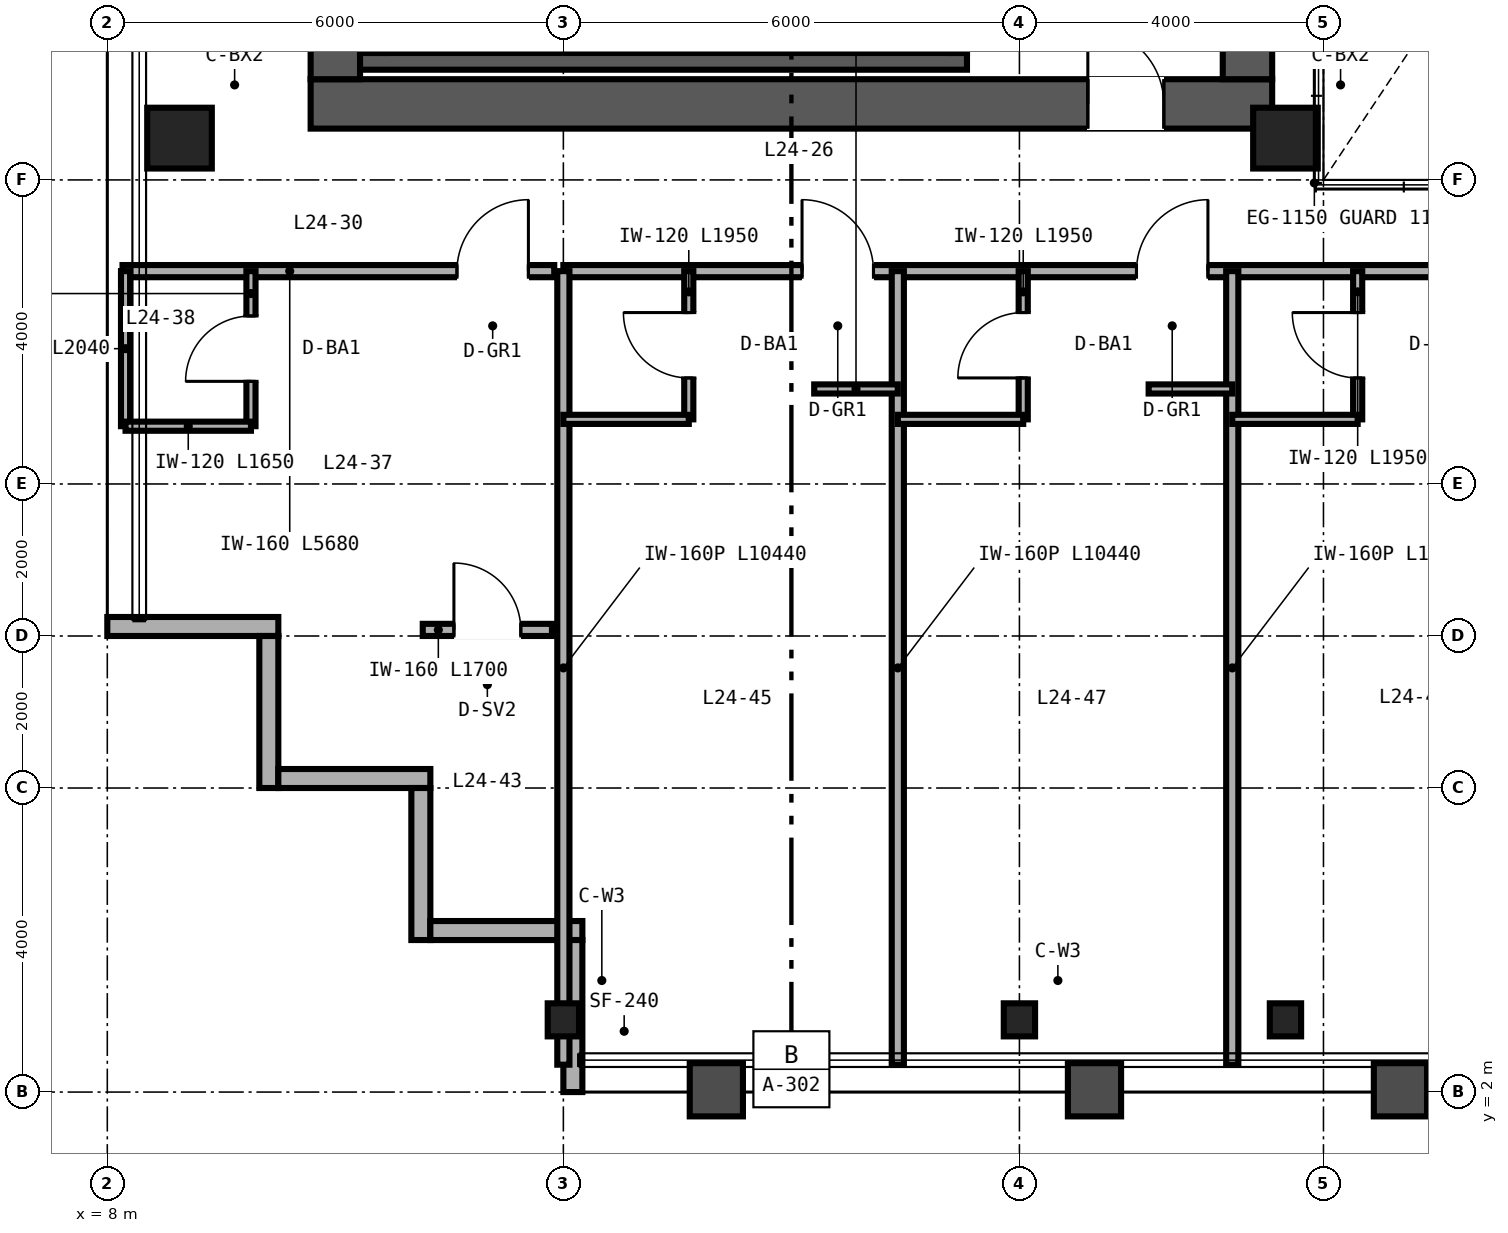
"""IFC4 building model, lengths in metres.
Left out: names, types, materials, properties, quantities, classifications, styles, units other than length and angle.
Written with IfcOpenShell. Run it as: python <this file> out.ifc"""

import sys

from ifc_helpers import new_model, si_unit, direction, frame, frame_2d, origin, origin_2d, place, context, subcontext, project, spatial, rectangle, hollow_rectangle, i_section, extrude, source, transform, mapped, element, fill, save


model = new_model("IFC4")
c1 = context("Model", 3, precision=1e-05, world=origin(), true_north=direction((0.0, 1.0)))
c2 = subcontext(c1, "Body", "Model", "MODEL_VIEW")
j1 = project(units=[si_unit("LENGTHUNIT", "METRE"), si_unit("PLANEANGLEUNIT", "RADIAN")], contexts=[c1])
p1 = place(None, origin())
s1 = spatial("IfcSite", under=j1, at=p1, CompositionType="ELEMENT")
p2 = place(p1, origin())
s2 = spatial("IfcBuilding", under=s1, at=p2, CompositionType="ELEMENT")
p3 = place(p2, frame((0.0, 0.0, 100.8)))
s3 = spatial("IfcBuildingStorey", under=s2, at=p3, CompositionType="ELEMENT", Elevation=100.8)
p4 = place(p3, frame((10.675, 15.0, 0.0), z_axis=(0.0, 0.0, 1.0), x_axis=(1.0, 0.0, 0.0)))
e1 = element("IfcWall", 1, at=p4, inside=s3, PredefinedType="SHEAR", context=c2, shape_type="SweptSolid", body=[
    extrude(rectangle(XDim=12.65, YDim=0.65, at=frame_2d((6.325, 0.0))), origin(), (0.0, 0.0, 1.0), 3.36),
])
p5 = place(p4, frame((10.225, 0.0, 0.0)))
e2 = element("IfcOpeningElement", 2, at=p5, cuts=e1, PredefinedType="OPENING", context=c2, shape_type="SweptSolid", body=[
    extrude(rectangle(XDim=1.0, YDim=2.15, at=frame_2d((0.5, 1.075))), frame((0.0, 0.335, 0.0), z_axis=(0.0, -1.0, 0.0), x_axis=(1.0, 0.0, 0.0)), (0.0, 0.0, 1.0), 0.67),
])
for number, where, z_axis, x_axis in (
    (3, (11.0, 15.325, 0.0), (0.0, 0.0, 1.0), (0.0, 1.0, 0.0)),
    (4, (23.0, 15.325, 0.0), (0.0, 0.0, 1.0), (0.0, 1.0, 0.0)),
):
    element("IfcWall", number, at=place(p3, frame(where, z_axis=z_axis, x_axis=x_axis)), inside=s3, PredefinedType="SHEAR", context=c2, shape_type="SweptSolid", body=[
        extrude(rectangle(XDim=21.35, YDim=0.65, at=frame_2d((10.675, 0.0))), origin(), (0.0, 0.0, 1.0), 3.36),
    ])
p6 = place(p3, frame((11.325, 15.56, 0.0), z_axis=(0.0, 0.0, 1.0), x_axis=(1.0, 0.0, 0.0)))
e5 = element("IfcWall", 5, at=p6, inside=s3, PredefinedType="SHEAR", context=c2, shape_type="SweptSolid", body=[
    extrude(rectangle(XDim=7.985, YDim=0.22, at=frame_2d((3.993, 0.0))), origin(), (0.0, 0.0, 1.0), 3.4),
])
for number, where, z_axis, x_axis in (
    (6, (11.56, 15.67, 0.0), (0.0, 0.0, 1.0), (0.0, 1.0, 0.0)),
    (7, (19.2, 15.67, 0.0), (0.0, 0.0, 1.0), (0.0, 1.0, 0.0)),
):
    element("IfcWall", number, at=place(p3, frame(where, z_axis=z_axis, x_axis=x_axis)), inside=s3, PredefinedType="SHEAR", context=c2, shape_type="SweptSolid", body=[
        extrude(rectangle(XDim=3.28, YDim=0.22, at=frame_2d((1.64, 0.0))), origin(), (0.0, 0.0, 1.0), 3.4),
    ])
m1 = source(origin(), c2, "Body", "SweptSolid", [
    extrude(hollow_rectangle(XDim=0.85, YDim=0.8, WallThickness=0.032, at=origin_2d()), origin(), (0.0, 0.0, 1.0), 3.36),
])
for number, where, z_axis, x_axis in (
    (8, (8.95, 14.55, 0.0), (0.0, 0.0, 1.0), (1.0, 0.0, 0.0)),
    (9, (23.5, 14.55, 0.0), (0.0, 0.0, 1.0), (1.0, 0.0, 0.0)),
):
    element("IfcColumn", number, at=place(p3, frame(where, z_axis=z_axis, x_axis=x_axis)), inside=s3, PredefinedType="COLUMN", context=c2, shape_type="MappedRepresentation", body=[
        mapped(m1, transform((0.0, 0.0, 0.0), scale=1.0)),
    ])
m2 = source(origin(), c2, "Body", "SweptSolid", [
    extrude(i_section(OverallWidth=0.412, OverallDepth=0.435, WebThickness=0.036, FlangeThickness=0.057, FilletRadius=0.025, at=origin_2d()), origin(), (0.0, 0.0, 1.0), 3.36),
])
for number, where, z_axis, x_axis in (
    (10, (14.0, 2.95, 0.0), (0.0, 0.0, 1.0), (1.0, 0.0, 0.0)),
    (11, (20.0, 2.95, 0.0), (0.0, 0.0, 1.0), (1.0, 0.0, 0.0)),
    (12, (23.5, 2.95, 0.0), (0.0, 0.0, 1.0), (1.0, 0.0, 0.0)),
):
    element("IfcColumn", number, at=place(p3, frame(where, z_axis=z_axis, x_axis=x_axis)), inside=s3, PredefinedType="COLUMN", context=c2, shape_type="MappedRepresentation", body=[
        mapped(m2, transform((0.0, 0.0, 0.0), scale=1.0)),
    ])
p7 = place(p3, frame((8.0, 8.125, 0.0), z_axis=(0.0, 0.0, 1.0), x_axis=(1.0, 0.0, 0.0)))
e13 = element("IfcWall", 13, at=p7, inside=s3, PredefinedType="SOLIDWALL", context=c2, shape_type="SweptSolid", body=[
    extrude(rectangle(XDim=2.25, YDim=0.25, at=frame_2d((1.125, 0.0))), origin(), (0.0, 0.0, 1.0), 3.36),
])
for number, where, z_axis, x_axis in (
    (14, (10.125, 8.0, 0.0), (0.0, 0.0, 1.0), (0.0, -1.0, 0.0)),
    (15, (10.25, 6.125, 0.0), (0.0, 0.0, 1.0), (1.0, 0.0, 0.0)),
    (16, (12.125, 6.0, 0.0), (0.0, 0.0, 1.0), (0.0, -1.0, 0.0)),
    (17, (12.25, 4.125, 0.0), (0.0, 0.0, 1.0), (1.0, 0.0, 0.0)),
):
    element("IfcWall", number, at=place(p3, frame(where, z_axis=z_axis, x_axis=x_axis)), inside=s3, PredefinedType="SOLIDWALL", context=c2, shape_type="SweptSolid", body=[
        extrude(rectangle(XDim=2.0, YDim=0.25, at=frame_2d((1.0, 0.0))), origin(), (0.0, 0.0, 1.0), 3.36),
    ])
p8 = place(p3, frame((14.125, 4.0, 0.0), z_axis=(0.0, 0.0, 1.0), x_axis=(0.0, -1.0, 0.0)))
e18 = element("IfcWall", 18, at=p8, inside=s3, PredefinedType="SOLIDWALL", context=c2, shape_type="SweptSolid", body=[
    extrude(rectangle(XDim=2.0, YDim=0.25, at=frame_2d((1.0, 0.0))), origin(), (0.0, 0.0, 1.0), 2.667),
])
p9 = place(p3, frame((8.2, 12.8, 0.0), z_axis=(0.0, 0.0, 1.0), x_axis=(1.0, 0.0, 0.0)))
e19 = element("IfcWall", 19, at=p9, inside=s3, PredefinedType="PARTITIONING", context=c2, shape_type="SweptSolid", body=[
    extrude(rectangle(XDim=5.68, YDim=0.16, at=frame_2d((2.84, 0.0))), origin(), (0.0, 0.0, 1.0), 3.36),
])
p10 = place(p9, frame((4.4, 0.0, 0.0)))
e20 = element("IfcOpeningElement", 20, at=p10, cuts=e19, PredefinedType="OPENING", context=c2, shape_type="SweptSolid", body=[
    extrude(rectangle(XDim=0.94, YDim=2.15, at=frame_2d((0.47, 1.075))), frame((0.0, 0.09, 0.0), z_axis=(0.0, -1.0, 0.0), x_axis=(1.0, 0.0, 0.0)), (0.0, 0.0, 1.0), 0.18),
])
p11 = place(p3, frame((9.89, 10.76, 0.0), z_axis=(0.0, 0.0, 1.0), x_axis=(0.0, 1.0, 0.0)))
e21 = element("IfcWall", 21, at=p11, inside=s3, PredefinedType="PARTITIONING", context=c2, shape_type="SweptSolid", body=[
    extrude(rectangle(XDim=2.04, YDim=0.12, at=frame_2d((1.02, 0.0))), origin(), (0.0, 0.0, 1.0), 3.36),
])
p12 = place(p11, frame((0.59, 0.0, 0.0)))
e22 = element("IfcOpeningElement", 22, at=p12, cuts=e21, PredefinedType="OPENING", context=c2, shape_type="SweptSolid", body=[
    extrude(rectangle(XDim=0.86, YDim=2.1, at=frame_2d((0.43, 1.05))), frame((0.0, 0.07, 0.0), z_axis=(0.0, -1.0, 0.0), x_axis=(1.0, 0.0, 0.0)), (0.0, 0.0, 1.0), 0.14),
])
p13 = place(p3, frame((8.24, 10.76, 0.0), z_axis=(0.0, 0.0, 1.0), x_axis=(0.0, 1.0, 0.0)))
e23 = element("IfcWall", 23, at=p13, inside=s3, PredefinedType="PARTITIONING", context=c2, shape_type="SweptSolid", body=[
    extrude(rectangle(XDim=2.04, YDim=0.12, at=frame_2d((1.02, 0.0))), origin(), (0.0, 0.0, 1.0), 3.36),
])
p14 = place(p3, frame((8.24, 10.76, 0.0), z_axis=(0.0, 0.0, 1.0), x_axis=(1.0, 0.0, 0.0)))
e24 = element("IfcWall", 24, at=p14, inside=s3, PredefinedType="PARTITIONING", context=c2, shape_type="SweptSolid", body=[
    extrude(rectangle(XDim=1.65, YDim=0.12, at=frame_2d((0.825, 0.0))), origin(), (0.0, 0.0, 1.0), 3.36),
])
p15 = place(p3, frame((12.15, 8.08, 0.0), z_axis=(0.0, 0.0, 1.0), x_axis=(1.0, 0.0, 0.0)))
e25 = element("IfcWall", 25, at=p15, inside=s3, PredefinedType="PARTITIONING", context=c2, shape_type="SweptSolid", body=[
    extrude(rectangle(XDim=1.7, YDim=0.16, at=frame_2d((0.85, 0.0))), origin(), (0.0, 0.0, 1.0), 3.36),
])
p16 = place(p15, frame((0.41, 0.0, 0.0)))
e26 = element("IfcOpeningElement", 26, at=p16, cuts=e25, PredefinedType="OPENING", context=c2, shape_type="SweptSolid", body=[
    extrude(rectangle(XDim=0.88, YDim=2.15, at=frame_2d((0.44, 1.075))), frame((0.0, 0.09, 0.0), z_axis=(0.0, -1.0, 0.0), x_axis=(1.0, 0.0, 0.0)), (0.0, 0.0, 1.0), 0.18),
])
p17 = place(p3, frame((14.0, 12.8, 0.0), z_axis=(0.0, 0.0, 1.0), x_axis=(1.0, 0.0, 0.0)))
e27 = element("IfcWall", 27, at=p17, inside=s3, PredefinedType="PARTITIONING", context=c2, shape_type="SweptSolid", body=[
    extrude(rectangle(XDim=36.0, YDim=0.16, at=frame_2d((18.0, 0.0))), origin(), (0.0, 0.0, 1.0), 2.581),
])
p18 = place(p17, frame((3.14, 0.0, 0.0)))
e28 = element("IfcOpeningElement", 28, at=p18, cuts=e27, PredefinedType="OPENING", context=c2, shape_type="SweptSolid", body=[
    extrude(rectangle(XDim=0.94, YDim=2.15, at=frame_2d((0.47, 1.075))), frame((0.0, 0.09, 0.0), z_axis=(0.0, -1.0, 0.0), x_axis=(1.0, 0.0, 0.0)), (0.0, 0.0, 1.0), 0.18),
])
p19 = place(p17, frame((7.54, 0.0, 0.0)))
e29 = element("IfcOpeningElement", 29, at=p19, cuts=e27, PredefinedType="OPENING", context=c2, shape_type="SweptSolid", body=[
    extrude(rectangle(XDim=0.94, YDim=2.15, at=frame_2d((0.47, 1.075))), frame((0.0, 0.09, 0.0), z_axis=(0.0, -1.0, 0.0), x_axis=(1.0, 0.0, 0.0)), (0.0, 0.0, 1.0), 0.18),
])
p20 = place(p17, frame((12.14, 0.0, 0.0)))
e30 = element("IfcOpeningElement", 30, at=p20, cuts=e27, PredefinedType="OPENING", context=c2, shape_type="SweptSolid", body=[
    extrude(rectangle(XDim=0.94, YDim=2.15, at=frame_2d((0.47, 1.075))), frame((0.0, 0.09, 0.0), z_axis=(0.0, -1.0, 0.0), x_axis=(1.0, 0.0, 0.0)), (0.0, 0.0, 1.0), 0.18),
])
p21 = place(p17, frame((16.94, 0.0, 0.0)))
e31 = element("IfcOpeningElement", 31, at=p21, cuts=e27, PredefinedType="OPENING", context=c2, shape_type="SweptSolid", body=[
    extrude(rectangle(XDim=0.94, YDim=2.15, at=frame_2d((0.47, 1.075))), frame((0.0, 0.09, 0.0), z_axis=(0.0, -1.0, 0.0), x_axis=(1.0, 0.0, 0.0)), (0.0, 0.0, 1.0), 0.18),
])
p22 = place(p17, frame((21.74, 0.0, 0.0)))
e32 = element("IfcOpeningElement", 32, at=p22, cuts=e27, PredefinedType="OPENING", context=c2, shape_type="SweptSolid", body=[
    extrude(rectangle(XDim=0.94, YDim=2.15, at=frame_2d((0.47, 1.075))), frame((0.0, 0.09, 0.0), z_axis=(0.0, -1.0, 0.0), x_axis=(1.0, 0.0, 0.0)), (0.0, 0.0, 1.0), 0.18),
])
p23 = place(p17, frame((26.34, 0.0, 0.0)))
e33 = element("IfcOpeningElement", 33, at=p23, cuts=e27, PredefinedType="OPENING", context=c2, shape_type="SweptSolid", body=[
    extrude(rectangle(XDim=0.94, YDim=2.15, at=frame_2d((0.47, 1.075))), frame((0.0, 0.09, 0.0), z_axis=(0.0, -1.0, 0.0), x_axis=(1.0, 0.0, 0.0)), (0.0, 0.0, 1.0), 0.18),
])
p24 = place(p17, frame((30.54, 0.0, 0.0)))
e34 = element("IfcOpeningElement", 34, at=p24, cuts=e27, PredefinedType="OPENING", context=c2, shape_type="SweptSolid", body=[
    extrude(rectangle(XDim=0.94, YDim=2.15, at=frame_2d((0.47, 1.075))), frame((0.0, 0.09, 0.0), z_axis=(0.0, -1.0, 0.0), x_axis=(1.0, 0.0, 0.0)), (0.0, 0.0, 1.0), 0.18),
])
p25 = place(p17, frame((34.74, 0.0, 0.0)))
e35 = element("IfcOpeningElement", 35, at=p25, cuts=e27, PredefinedType="OPENING", context=c2, shape_type="SweptSolid", body=[
    extrude(rectangle(XDim=0.94, YDim=2.15, at=frame_2d((0.47, 1.075))), frame((0.0, 0.09, 0.0), z_axis=(0.0, -1.0, 0.0), x_axis=(1.0, 0.0, 0.0)), (0.0, 0.0, 1.0), 0.18),
])
for number, where, z_axis, x_axis in (
    (36, (14.0, 2.36, 0.0), (0.0, 0.0, 1.0), (0.0, 1.0, 0.0)),
    (37, (18.4, 2.36, 0.0), (0.0, 0.0, 1.0), (0.0, 1.0, 0.0)),
):
    element("IfcWall", number, at=place(p3, frame(where, z_axis=z_axis, x_axis=x_axis)), inside=s3, PredefinedType="PARTITIONING", context=c2, shape_type="SweptSolid", body=[
        extrude(rectangle(XDim=10.44, YDim=0.16, at=frame_2d((5.22, 0.0))), origin(), (0.0, 0.0, 1.0), 2.667),
    ])
p26 = place(p3, frame((15.65, 10.85, 0.0), z_axis=(0.0, 0.0, 1.0), x_axis=(0.0, 1.0, 0.0)))
e38 = element("IfcWall", 38, at=p26, inside=s3, PredefinedType="PARTITIONING", context=c2, shape_type="SweptSolid", body=[
    extrude(rectangle(XDim=1.95, YDim=0.12, at=frame_2d((0.975, 0.0))), origin(), (0.0, 0.0, 1.0), 3.36),
])
p27 = place(p26, frame((0.545, 0.0, 0.0)))
e39 = element("IfcOpeningElement", 39, at=p27, cuts=e38, PredefinedType="OPENING", context=c2, shape_type="SweptSolid", body=[
    extrude(rectangle(XDim=0.86, YDim=2.1, at=frame_2d((0.43, 1.05))), frame((0.0, 0.07, 0.0), z_axis=(0.0, -1.0, 0.0), x_axis=(1.0, 0.0, 0.0)), (0.0, 0.0, 1.0), 0.14),
])
p28 = place(p3, frame((14.0, 10.85, 0.0), z_axis=(0.0, 0.0, 1.0), x_axis=(1.0, 0.0, 0.0)))
e40 = element("IfcWall", 40, at=p28, inside=s3, PredefinedType="PARTITIONING", context=c2, shape_type="SweptSolid", body=[
    extrude(rectangle(XDim=1.65, YDim=0.12, at=frame_2d((0.825, 0.0))), origin(), (0.0, 0.0, 1.0), 3.36),
])
p29 = place(p3, frame((17.3, 11.25, 0.0), z_axis=(0.0, 0.0, 1.0), x_axis=(1.0, 0.0, 0.0)))
e41 = element("IfcWall", 41, at=p29, inside=s3, PredefinedType="PARTITIONING", context=c2, shape_type="SweptSolid", body=[
    extrude(rectangle(XDim=1.1, YDim=0.12, at=frame_2d((0.55, 0.0))), origin(), (0.0, 0.0, 1.0), 3.36),
])
p30 = place(p3, frame((22.8, 2.36, 0.0), z_axis=(0.0, 0.0, 1.0), x_axis=(0.0, 1.0, 0.0)))
e42 = element("IfcWall", 42, at=p30, inside=s3, PredefinedType="PARTITIONING", context=c2, shape_type="SweptSolid", body=[
    extrude(rectangle(XDim=10.44, YDim=0.16, at=frame_2d((5.22, 0.0))), origin(), (0.0, 0.0, 1.0), 2.823),
])
p31 = place(p3, frame((20.05, 10.85, 0.0), z_axis=(0.0, 0.0, 1.0), x_axis=(0.0, 1.0, 0.0)))
e43 = element("IfcWall", 43, at=p31, inside=s3, PredefinedType="PARTITIONING", context=c2, shape_type="SweptSolid", body=[
    extrude(rectangle(XDim=1.95, YDim=0.12, at=frame_2d((0.975, 0.0))), origin(), (0.0, 0.0, 1.0), 3.36),
])
p32 = place(p31, frame((0.545, 0.0, 0.0)))
e44 = element("IfcOpeningElement", 44, at=p32, cuts=e43, PredefinedType="OPENING", context=c2, shape_type="SweptSolid", body=[
    extrude(rectangle(XDim=0.86, YDim=2.1, at=frame_2d((0.43, 1.05))), frame((0.0, 0.07, 0.0), z_axis=(0.0, -1.0, 0.0), x_axis=(1.0, 0.0, 0.0)), (0.0, 0.0, 1.0), 0.14),
])
p33 = place(p3, frame((18.4, 10.85, 0.0), z_axis=(0.0, 0.0, 1.0), x_axis=(1.0, 0.0, 0.0)))
e45 = element("IfcWall", 45, at=p33, inside=s3, PredefinedType="PARTITIONING", context=c2, shape_type="SweptSolid", body=[
    extrude(rectangle(XDim=1.65, YDim=0.12, at=frame_2d((0.825, 0.0))), origin(), (0.0, 0.0, 1.0), 3.36),
])
p34 = place(p3, frame((21.7, 11.25, 0.0), z_axis=(0.0, 0.0, 1.0), x_axis=(1.0, 0.0, 0.0)))
e46 = element("IfcWall", 46, at=p34, inside=s3, PredefinedType="PARTITIONING", context=c2, shape_type="SweptSolid", body=[
    extrude(rectangle(XDim=1.1, YDim=0.12, at=frame_2d((0.55, 0.0))), origin(), (0.0, 0.0, 1.0), 3.36),
])
p35 = place(p3, frame((24.45, 10.85, 0.0), z_axis=(0.0, 0.0, 1.0), x_axis=(0.0, 1.0, 0.0)))
e47 = element("IfcWall", 47, at=p35, inside=s3, PredefinedType="PARTITIONING", context=c2, shape_type="SweptSolid", body=[
    extrude(rectangle(XDim=1.95, YDim=0.12, at=frame_2d((0.975, 0.0))), origin(), (0.0, 0.0, 1.0), 3.36),
])
p36 = place(p35, frame((0.545, 0.0, 0.0)))
e48 = element("IfcOpeningElement", 48, at=p36, cuts=e47, PredefinedType="OPENING", context=c2, shape_type="SweptSolid", body=[
    extrude(rectangle(XDim=0.86, YDim=2.1, at=frame_2d((0.43, 1.05))), frame((0.0, 0.07, 0.0), z_axis=(0.0, -1.0, 0.0), x_axis=(1.0, 0.0, 0.0)), (0.0, 0.0, 1.0), 0.14),
])
p37 = place(p3, frame((22.8, 10.85, 0.0), z_axis=(0.0, 0.0, 1.0), x_axis=(1.0, 0.0, 0.0)))
e49 = element("IfcWall", 49, at=p37, inside=s3, PredefinedType="PARTITIONING", context=c2, shape_type="SweptSolid", body=[
    extrude(rectangle(XDim=1.65, YDim=0.12, at=frame_2d((0.825, 0.0))), origin(), (0.0, 0.0, 1.0), 2.581),
])
m3 = source(origin(), c2, "Body", "SweptSolid", [
    extrude(rectangle(XDim=1.0, YDim=2.15, at=frame_2d((0.5, 1.075))), frame((0.0, 0.025, 0.0), z_axis=(0.0, -1.0, 0.0), x_axis=(1.0, 0.0, 0.0)), (0.0, 0.0, 1.0), 0.05),
])
p38 = place(p5, origin())
e50 = element("IfcDoor", 50, at=p38, inside=s3, OperationType="SINGLE_SWING_LEFT", PredefinedType="DOOR", context=c2, shape_type="MappedRepresentation", body=[
    mapped(m3, transform((0.0, 0.0, 0.0), scale=1.0)),
])
fill(e2, e50)
m4 = source(origin(), c2, "Body", "SweptSolid", [
    extrude(rectangle(XDim=0.86, YDim=2.1, at=frame_2d((0.43, 1.05))), frame((0.0, 0.025, 0.0), z_axis=(0.0, -1.0, 0.0), x_axis=(1.0, 0.0, 0.0)), (0.0, 0.0, 1.0), 0.05),
])
p39 = place(p12, origin())
e51 = element("IfcDoor", 51, at=p39, inside=s3, OperationType="SINGLE_SWING_LEFT", PredefinedType="DOOR", context=c2, shape_type="MappedRepresentation", body=[
    mapped(m4, transform((0.0, 0.0, 0.0), scale=1.0)),
])
fill(e22, e51)
m5 = source(origin(), c2, "Body", "SweptSolid", [
    extrude(rectangle(XDim=0.94, YDim=2.15, at=frame_2d((0.47, 1.075))), frame((0.0, 0.025, 0.0), z_axis=(0.0, -1.0, 0.0), x_axis=(1.0, 0.0, 0.0)), (0.0, 0.0, 1.0), 0.05),
])
p40 = place(p10, origin())
e52 = element("IfcDoor", 52, at=p40, inside=s3, OperationType="SINGLE_SWING_RIGHT", PredefinedType="DOOR", context=c2, shape_type="MappedRepresentation", body=[
    mapped(m5, transform((0.0, 0.0, 0.0), scale=1.0)),
])
fill(e20, e52)
m6 = source(origin(), c2, "Body", "SweptSolid", [
    extrude(rectangle(XDim=0.88, YDim=2.15, at=frame_2d((0.44, 1.075))), frame((0.0, 0.025, 0.0), z_axis=(0.0, -1.0, 0.0), x_axis=(1.0, 0.0, 0.0)), (0.0, 0.0, 1.0), 0.05),
])
p41 = place(p16, origin())
e53 = element("IfcDoor", 53, at=p41, inside=s3, OperationType="SINGLE_SWING_LEFT", PredefinedType="DOOR", context=c2, shape_type="MappedRepresentation", body=[
    mapped(m6, transform((0.0, 0.0, 0.0), scale=1.0)),
])
fill(e26, e53)
p42 = place(p27, origin())
e54 = element("IfcDoor", 54, at=p42, inside=s3, OperationType="SINGLE_SWING_RIGHT", PredefinedType="DOOR", context=c2, shape_type="MappedRepresentation", body=[
    mapped(m4, transform((0.0, 0.0, 0.0), scale=1.0)),
])
fill(e39, e54)
p43 = place(p32, origin())
e55 = element("IfcDoor", 55, at=p43, inside=s3, OperationType="SINGLE_SWING_LEFT", PredefinedType="DOOR", context=c2, shape_type="MappedRepresentation", body=[
    mapped(m4, transform((0.0, 0.0, 0.0), scale=1.0)),
])
fill(e44, e55)
p44 = place(p36, origin())
e56 = element("IfcDoor", 56, at=p44, inside=s3, OperationType="SINGLE_SWING_RIGHT", PredefinedType="DOOR", context=c2, shape_type="MappedRepresentation", body=[
    mapped(m4, transform((0.0, 0.0, 0.0), scale=1.0)),
])
fill(e48, e56)
p45 = place(p18, origin())
e57 = element("IfcDoor", 57, at=p45, inside=s3, OperationType="SINGLE_SWING_LEFT", PredefinedType="DOOR", context=c2, shape_type="MappedRepresentation", body=[
    mapped(m5, transform((0.0, 0.0, 0.0), scale=1.0)),
])
fill(e28, e57)
p46 = place(p19, origin())
e58 = element("IfcDoor", 58, at=p46, inside=s3, OperationType="SINGLE_SWING_RIGHT", PredefinedType="DOOR", context=c2, shape_type="MappedRepresentation", body=[
    mapped(m5, transform((0.0, 0.0, 0.0), scale=1.0)),
])
fill(e29, e58)
save(model, sys.argv[1])
